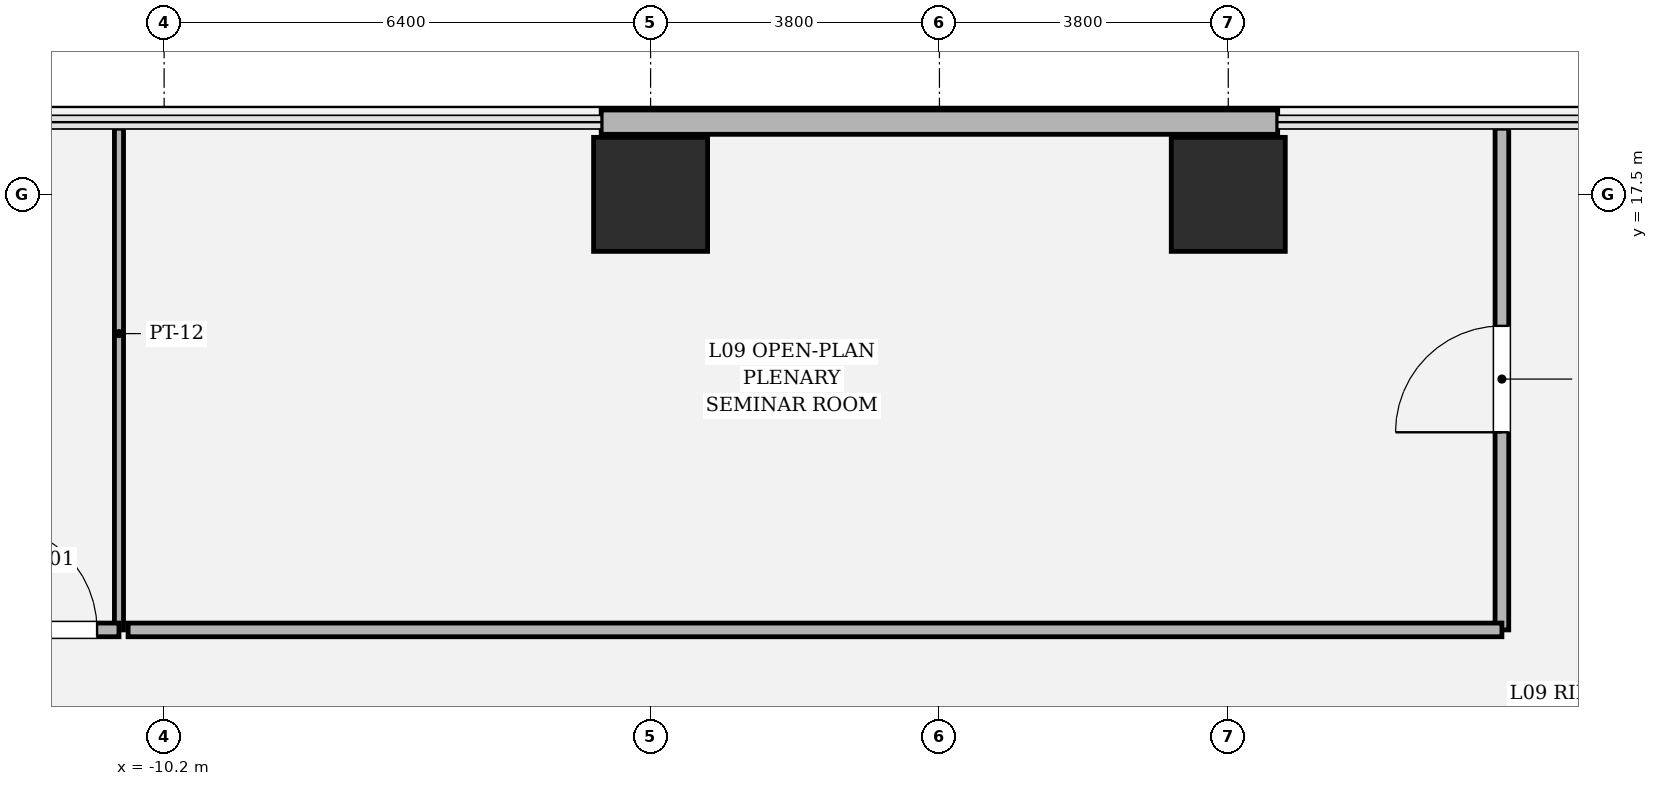
"""IFC4 building model, lengths in metres.
Left out: names, types, materials, properties, quantities, classifications, styles, units other than length and angle.
Written with IfcOpenShell. Run it as: python <this file> out.ifc"""

import sys

from ifc_helpers import new_model, si_unit, direction, frame, frame_2d, origin, origin_2d, place, context, subcontext, project, spatial, rectangle, hollow_rectangle, extrude, element, fill, save


model = new_model("IFC4")
c1 = context("Model", 3, precision=1e-05, world=origin(), true_north=direction((0.0, 1.0)))
c2 = subcontext(c1, "Body", "Model", "MODEL_VIEW")
j1 = project(units=[si_unit("LENGTHUNIT", "METRE"), si_unit("PLANEANGLEUNIT", "RADIAN")], contexts=[c1])
p1 = place(None, origin())
s1 = spatial("IfcSite", under=j1, at=p1, CompositionType="ELEMENT")
p2 = place(p1, origin())
s2 = spatial("IfcBuilding", under=s1, at=p2, CompositionType="ELEMENT")
p3 = place(p2, frame((0.0, 0.0, 44.4)))
s3 = spatial("IfcBuildingStorey", under=s2, at=p3, CompositionType="ELEMENT", Elevation=44.4)
for number, where, z_axis, x_axis in (
    (1, (3.8, 17.5, 0.0), (0.0, 0.0, 1.0), (1.0, 0.0, 0.0)),
    (2, (-3.8, 17.5, 0.0), (0.0, 0.0, 1.0), (1.0, 0.0, 0.0)),
):
    element("IfcColumn", number, at=place(p3, frame(where, z_axis=z_axis, x_axis=x_axis)), inside=s3, PredefinedType="COLUMN", context=c2, shape_type="SweptSolid", body=[
        extrude(hollow_rectangle(XDim=1.5, YDim=1.5, WallThickness=0.045, at=origin_2d()), origin(), (0.0, 0.0, 1.0), 4.05),
    ])
p4 = place(p3, frame((4.45, 18.45, 0.0), z_axis=(0.0, 0.0, 1.0), x_axis=(-1.0, 0.0, 0.0)))
e3 = element("IfcWall", 3, at=p4, inside=s3, PredefinedType="SOLIDWALL", context=c2, shape_type="SweptSolid", body=[
    extrude(rectangle(XDim=8.9, YDim=0.32, at=frame_2d((4.45, 0.0))), origin(), (0.0, 0.0, 1.0), 3.81),
])
p5 = place(p3, frame((-10.794, 18.37, 0.0), z_axis=(0.0, 0.0, 1.0), x_axis=(0.0, -1.0, 0.0)))
e4 = element("IfcWall", 4, at=p5, inside=s3, PredefinedType="PARTITIONING", context=c2, shape_type="SweptSolid", body=[
    extrude(rectangle(XDim=6.6, YDim=0.12, at=frame_2d((3.3, 0.0))), origin(), (0.0, 0.0, 1.0), 3.104),
])
p6 = place(p3, frame((-10.794, 11.77, 0.0), z_axis=(0.0, 0.0, 1.0), x_axis=(-1.0, 0.0, 0.0)))
e5 = element("IfcWall", 5, at=p6, inside=s3, PredefinedType="PARTITIONING", context=c2, shape_type="SweptSolid", body=[
    extrude(rectangle(XDim=1.976, YDim=0.18, at=frame_2d((0.988, 0.0))), origin(), (0.0, 0.0, 1.0), 3.81),
])
p7 = place(p6, frame((0.288, 0.0, 0.0)))
e6 = element("IfcOpeningElement", 6, at=p7, cuts=e5, PredefinedType="OPENING", context=c2, shape_type="SweptSolid", body=[
    extrude(rectangle(XDim=1.4, YDim=2.25, at=frame_2d((0.7, 1.125))), frame((0.0, 0.1, 0.0), z_axis=(0.0, -1.0, 0.0), x_axis=(1.0, 0.0, 0.0)), (0.0, 0.0, 1.0), 0.2),
])
p8 = place(p3, frame((7.4, 18.37, 0.0), z_axis=(0.0, 0.0, 1.0), x_axis=(0.0, -1.0, 0.0)))
e7 = element("IfcWall", 7, at=p8, inside=s3, PredefinedType="PARTITIONING", context=c2, shape_type="SweptSolid", body=[
    extrude(rectangle(XDim=6.6, YDim=0.18, at=frame_2d((3.3, 0.0))), origin(), (0.0, 0.0, 1.0), 3.104),
])
p9 = place(p8, frame((2.6, 0.0, 0.0)))
e8 = element("IfcOpeningElement", 8, at=p9, cuts=e7, PredefinedType="OPENING", context=c2, shape_type="SweptSolid", body=[
    extrude(rectangle(XDim=1.4, YDim=2.25, at=frame_2d((0.7, 1.125))), frame((0.0, 0.1, 0.0), z_axis=(0.0, -1.0, 0.0), x_axis=(1.0, 0.0, 0.0)), (0.0, 0.0, 1.0), 0.2),
])
p10 = place(p3, frame((7.4, 11.77, 0.0), z_axis=(0.0, 0.0, 1.0), x_axis=(-1.0, 0.0, 0.0)))
e9 = element("IfcWall", 9, at=p10, inside=s3, PredefinedType="PARTITIONING", context=c2, shape_type="SweptSolid", body=[
    extrude(rectangle(XDim=18.074, YDim=0.18, at=frame_2d((9.037, 0.0))), origin(), (0.0, 0.0, 1.0), 3.104),
])
p11 = place(p7, origin())
e10 = element("IfcDoor", 10, at=p11, inside=s3, OperationType="SINGLE_SWING_RIGHT", PredefinedType="DOOR", context=c2, shape_type="SweptSolid", body=[
    extrude(rectangle(XDim=1.4, YDim=2.25, at=frame_2d((0.7, 1.125))), frame((0.0, 0.025, 0.0), z_axis=(0.0, -1.0, 0.0), x_axis=(1.0, 0.0, 0.0)), (0.0, 0.0, 1.0), 0.05),
])
fill(e6, e10)
p12 = place(p9, origin())
e11 = element("IfcDoor", 11, at=p12, inside=s3, OperationType="SINGLE_SWING_RIGHT", PredefinedType="DOOR", context=c2, shape_type="SweptSolid", body=[
    extrude(rectangle(XDim=1.4, YDim=2.25, at=frame_2d((0.7, 1.125))), frame((0.0, 0.025, 0.0), z_axis=(0.0, -1.0, 0.0), x_axis=(1.0, 0.0, 0.0)), (0.0, 0.0, 1.0), 0.05),
])
fill(e8, e11)
save(model, sys.argv[1])
